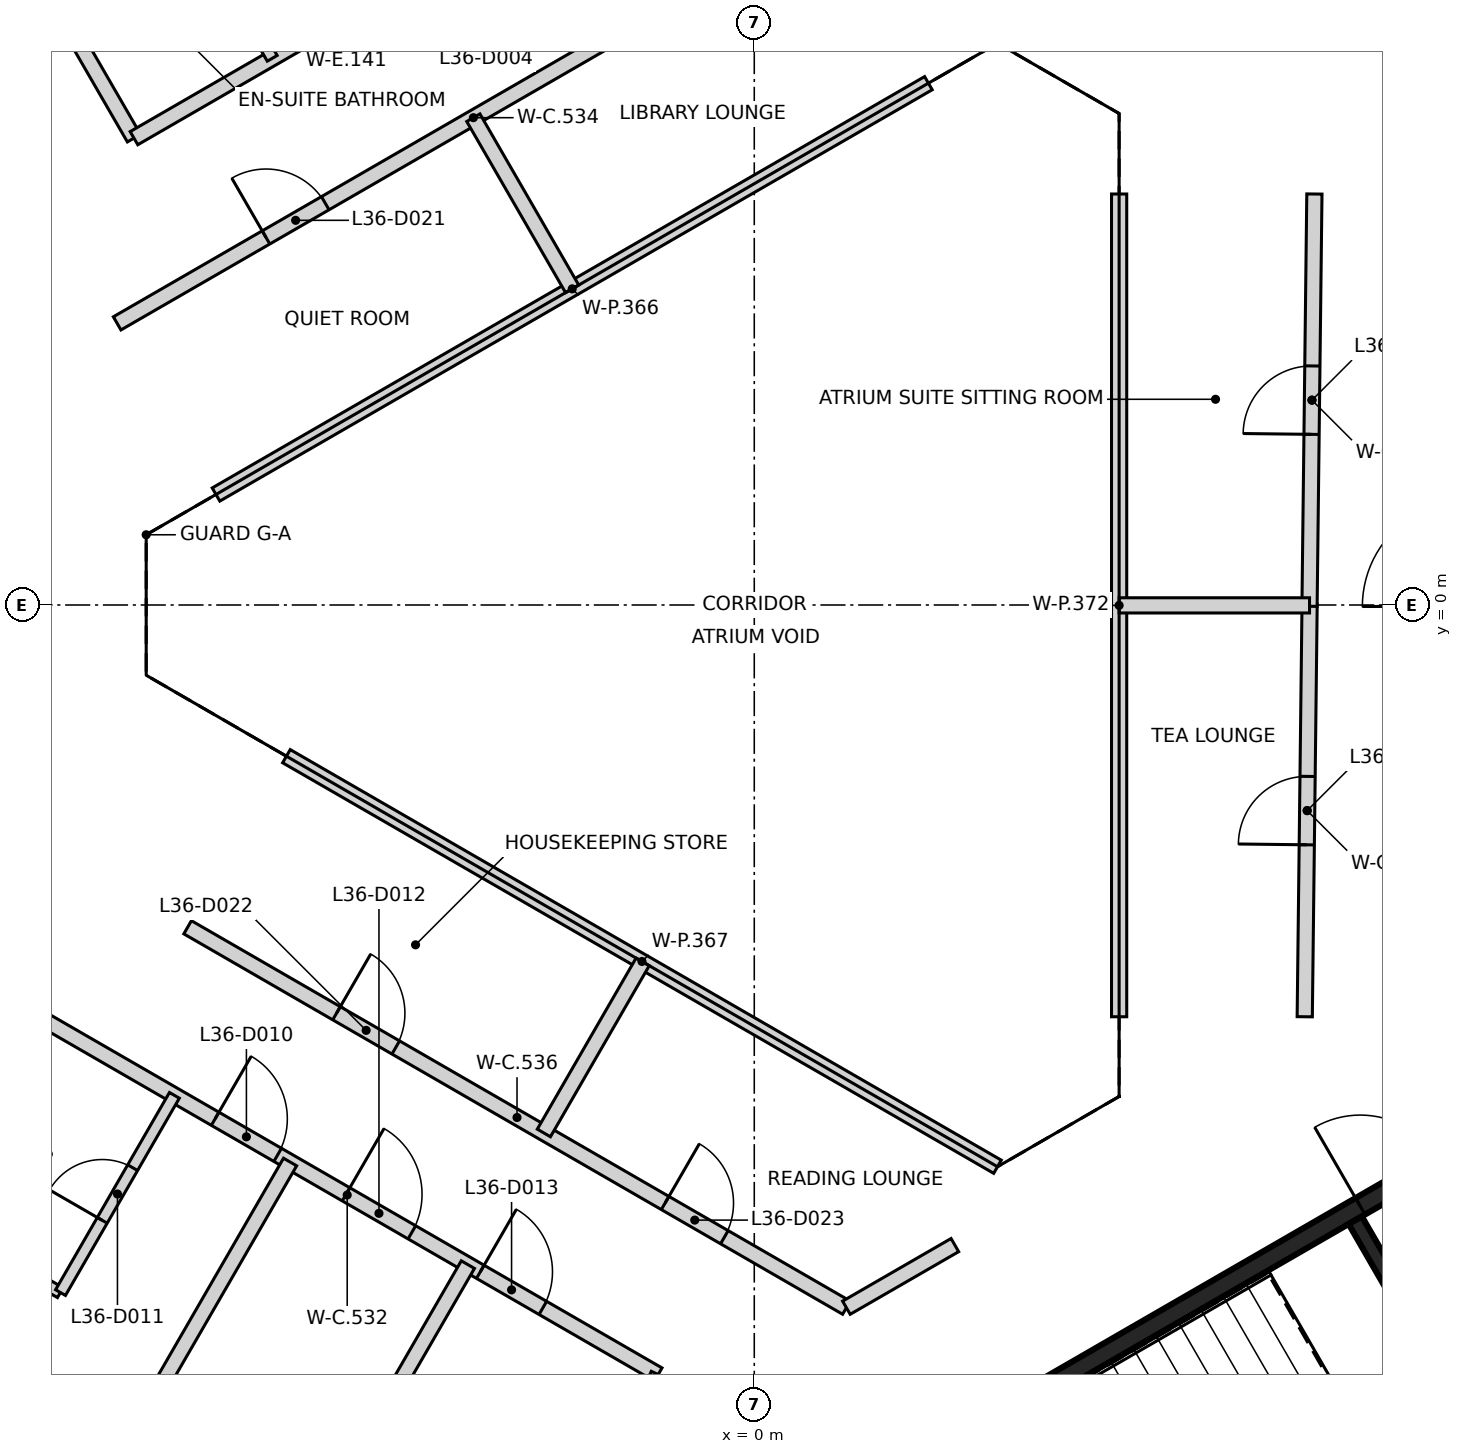
"""IFC4 building model, lengths in metres.
Left out: names, types, materials, properties, quantities, classifications, styles, units other than length and angle.
Written with IfcOpenShell. Run it as: python <this file> out.ifc"""

import sys

from ifc_helpers import new_model, si_unit, direction, frame, frame_2d, origin, place, context, subcontext, project, spatial, rectangle, extrude, element, fill, save


model = new_model("IFC4")
c1 = context("Model", 3, precision=1e-05, world=origin(), true_north=direction((0.0, 1.0)))
c2 = subcontext(c1, "Body", "Model", "MODEL_VIEW")
j1 = project(units=[si_unit("LENGTHUNIT", "METRE"), si_unit("PLANEANGLEUNIT", "RADIAN")], contexts=[c1])
p1 = place(None, origin())
s1 = spatial("IfcSite", under=j1, at=p1, CompositionType="ELEMENT")
p2 = place(p1, origin())
s2 = spatial("IfcBuilding", under=s1, at=p2, CompositionType="ELEMENT")
p3 = place(p2, frame((0.0, 0.0, 146.8)))
s3 = spatial("IfcBuildingStorey", under=s2, at=p3, CompositionType="ELEMENT", Elevation=146.8)
p4 = place(p3, frame((10.42, 6.498, 0.0), z_axis=(0.0, 0.0, 1.0), x_axis=(-0.866021906294, 0.500006057782, 0.0)))
e1 = element("IfcWall", 1, at=p4, inside=s3, PredefinedType="SHEAR", context=c2, shape_type="SweptSolid", body=[
    extrude(rectangle(XDim=11.55, YDim=0.25, at=frame_2d((5.775, 0.0))), origin(), (0.0, 0.0, 1.0), 3.2),
])
p5 = place(p4, frame((10.025, 0.0, 0.0)))
e2 = element("IfcOpeningElement", 2, at=p5, cuts=e1, PredefinedType="OPENING", context=c2, shape_type="SweptSolid", body=[
    extrude(rectangle(XDim=1.2, YDim=2.1, at=frame_2d((0.6, 1.05))), frame((0.0, 0.135, 0.0), z_axis=(0.0, -1.0, 0.0), x_axis=(1.0, 0.0, 0.0)), (0.0, 0.0, 1.0), 0.27),
])
p6 = place(p4, frame((8.725, 0.0, 0.0)))
e3 = element("IfcOpeningElement", 3, at=p6, cuts=e1, PredefinedType="OPENING", context=c2, shape_type="SweptSolid", body=[
    extrude(rectangle(XDim=1.2, YDim=2.1, at=frame_2d((0.6, 1.05))), frame((0.0, 0.135, 0.0), z_axis=(0.0, -1.0, 0.0), x_axis=(1.0, 0.0, 0.0)), (0.0, 0.0, 1.0), 0.27),
])
p7 = place(p3, frame((0.417, -12.273, 0.0), z_axis=(0.0, 0.0, 1.0), x_axis=(0.866021906294, 0.500006057782, 0.0)))
e4 = element("IfcWall", 4, at=p7, inside=s3, PredefinedType="SHEAR", context=c2, shape_type="SweptSolid", body=[
    extrude(rectangle(XDim=11.55, YDim=0.25, at=frame_2d((5.775, 0.0))), origin(), (0.0, 0.0, 1.0), 3.2),
])
p8 = place(p7, frame((10.025, 0.0, 0.0)))
e5 = element("IfcOpeningElement", 5, at=p8, cuts=e4, PredefinedType="OPENING", context=c2, shape_type="SweptSolid", body=[
    extrude(rectangle(XDim=1.2, YDim=2.1, at=frame_2d((0.6, 1.05))), frame((0.0, 0.135, 0.0), z_axis=(0.0, -1.0, 0.0), x_axis=(1.0, 0.0, 0.0)), (0.0, 0.0, 1.0), 0.27),
])
p9 = place(p7, frame((8.725, 0.0, 0.0)))
e6 = element("IfcOpeningElement", 6, at=p9, cuts=e4, PredefinedType="OPENING", context=c2, shape_type="SweptSolid", body=[
    extrude(rectangle(XDim=1.2, YDim=2.1, at=frame_2d((0.6, 1.05))), frame((0.0, 0.135, 0.0), z_axis=(0.0, -1.0, 0.0), x_axis=(1.0, 0.0, 0.0)), (0.0, 0.0, 1.0), 0.27),
])
p10 = place(p3, frame((7.906, -8.094, 0.0), z_axis=(0.0, 0.0, 1.0), x_axis=(0.500024287448, -0.866011380966, 0.0)))
e7 = element("IfcWall", 7, at=p10, inside=s3, PredefinedType="SHEAR", context=c2, shape_type="SweptSolid", body=[
    extrude(rectangle(XDim=5.251, YDim=0.2, at=frame_2d((2.625, 0.0))), origin(), (0.0, 0.0, 1.0), 3.2),
])
p11 = place(p10, frame((1.849, 0.0, 0.0)))
e8 = element("IfcOpeningElement", 8, at=p11, cuts=e7, PredefinedType="OPENING", context=c2, shape_type="SweptSolid", body=[
    extrude(rectangle(XDim=1.4, YDim=2.1, at=frame_2d((0.7, 1.05))), frame((0.0, 0.11, 0.0), z_axis=(0.0, -1.0, 0.0), x_axis=(1.0, 0.0, 0.0)), (0.0, 0.0, 1.0), 0.22),
])
p12 = place(p3, frame((-9.447, -5.4, 0.0), z_axis=(0.0, 0.0, 1.0), x_axis=(0.866101262146, -0.49986858644, 0.0)))
e9 = element("IfcWall", 9, at=p12, inside=s3, PredefinedType="PARTITIONING", context=c2, shape_type="SweptSolid", body=[
    extrude(rectangle(XDim=9.449, YDim=0.2, at=frame_2d((4.724, 0.0))), origin(), (0.0, 0.0, 1.0), 3.2),
])
p13 = place(p12, frame((2.718, 0.0, 0.0)))
e10 = element("IfcOpeningElement", 10, at=p13, cuts=e9, PredefinedType="OPENING", context=c2, shape_type="SweptSolid", body=[
    extrude(rectangle(XDim=0.95, YDim=2.1, at=frame_2d((0.475, 1.05))), frame((0.0, 0.11, 0.0), z_axis=(0.0, -1.0, 0.0), x_axis=(1.0, 0.0, 0.0)), (0.0, 0.0, 1.0), 0.22),
])
p14 = place(p12, frame((4.707, 0.0, 0.0)))
e11 = element("IfcOpeningElement", 11, at=p14, cuts=e9, PredefinedType="OPENING", context=c2, shape_type="SweptSolid", body=[
    extrude(rectangle(XDim=1.0, YDim=2.1, at=frame_2d((0.5, 1.05))), frame((0.0, 0.11, 0.0), z_axis=(0.0, -1.0, 0.0), x_axis=(1.0, 0.0, 0.0)), (0.0, 0.0, 1.0), 0.22),
])
p15 = place(p12, frame((6.746, 0.0, 0.0)))
e12 = element("IfcOpeningElement", 12, at=p15, cuts=e9, PredefinedType="OPENING", context=c2, shape_type="SweptSolid", body=[
    extrude(rectangle(XDim=0.95, YDim=2.1, at=frame_2d((0.475, 1.05))), frame((0.0, 0.11, 0.0), z_axis=(0.0, -1.0, 0.0), x_axis=(1.0, 0.0, 0.0)), (0.0, 0.0, 1.0), 0.22),
])
p16 = place(p3, frame((-9.033, 7.651, 0.0), z_axis=(0.0, 0.0, 1.0), x_axis=(0.500417633986, -0.865784148386, 0.0)))
e13 = element("IfcWall", 13, at=p16, inside=s3, PredefinedType="PARTITIONING", context=c2, shape_type="SweptSolid", body=[
    extrude(rectangle(XDim=1.743, YDim=0.2, at=frame_2d((0.871, 0.0))), origin(), (0.0, 0.0, 1.0), 3.2),
])
p17 = place(p3, frame((-8.382, 3.705, 0.0), z_axis=(0.0, 0.0, 1.0), x_axis=(0.866012036978, 0.500023151273, 0.0)))
e14 = element("IfcWall", 14, at=p17, inside=s3, PredefinedType="PARTITIONING", context=c2, shape_type="SweptSolid", body=[
    extrude(rectangle(XDim=10.823, YDim=0.2, at=frame_2d((5.412, 0.0))), origin(), (0.0, 0.0, 1.0), 3.2),
])
p18 = place(p17, frame((7.661, 0.0, 0.0)))
e15 = element("IfcOpeningElement", 15, at=p18, cuts=e14, PredefinedType="OPENING", context=c2, shape_type="SweptSolid", body=[
    extrude(rectangle(XDim=0.9, YDim=2.1, at=frame_2d((0.45, 1.05))), frame((0.0, 0.11, 0.0), z_axis=(0.0, -1.0, 0.0), x_axis=(1.0, 0.0, 0.0)), (0.0, 0.0, 1.0), 0.22),
])
p19 = place(p17, frame((2.261, 0.0, 0.0)))
e16 = element("IfcOpeningElement", 16, at=p19, cuts=e14, PredefinedType="OPENING", context=c2, shape_type="SweptSolid", body=[
    extrude(rectangle(XDim=0.9, YDim=2.1, at=frame_2d((0.45, 1.05))), frame((0.0, 0.11, 0.0), z_axis=(0.0, -1.0, 0.0), x_axis=(1.0, 0.0, 0.0)), (0.0, 0.0, 1.0), 0.22),
])
p20 = place(p3, frame((-8.161, 6.142, 0.0), z_axis=(0.0, 0.0, 1.0), x_axis=(0.865927304867, 0.500169873828, 0.0)))
e17 = element("IfcWall", 17, at=p20, inside=s3, PredefinedType="PARTITIONING", context=c2, shape_type="SweptSolid", body=[
    extrude(rectangle(XDim=9.478, YDim=0.2, at=frame_2d((4.739, 0.0))), origin(), (0.0, 0.0, 1.0), 3.2),
])
p21 = place(p20, frame((4.851, 0.0, 0.0)))
e18 = element("IfcOpeningElement", 18, at=p21, cuts=e17, PredefinedType="OPENING", context=c2, shape_type="SweptSolid", body=[
    extrude(rectangle(XDim=1.0, YDim=2.1, at=frame_2d((0.5, 1.05))), frame((0.0, 0.11, 0.0), z_axis=(0.0, -1.0, 0.0), x_axis=(1.0, 0.0, 0.0)), (0.0, 0.0, 1.0), 0.22),
])
p22 = place(p20, frame((7.583, 0.0, 0.0)))
e19 = element("IfcOpeningElement", 19, at=p22, cuts=e17, PredefinedType="OPENING", context=c2, shape_type="SweptSolid", body=[
    extrude(rectangle(XDim=1.0, YDim=2.1, at=frame_2d((0.5, 1.05))), frame((0.0, 0.11, 0.0), z_axis=(0.0, -1.0, 0.0), x_axis=(1.0, 0.0, 0.0)), (0.0, 0.0, 1.0), 0.22),
])
p23 = place(p3, frame((-7.455, -4.24, 0.0), z_axis=(0.0, 0.0, 1.0), x_axis=(0.866015783746, -0.500016662025, 0.0)))
e20 = element("IfcWall", 20, at=p23, inside=s3, PredefinedType="PARTITIONING", context=c2, shape_type="SweptSolid", body=[
    extrude(rectangle(XDim=10.009, YDim=0.2, at=frame_2d((5.004, 0.0))), origin(), (0.0, 0.0, 1.0), 3.2),
])
p24 = place(p23, frame((2.262, 0.0, 0.0)))
e21 = element("IfcOpeningElement", 21, at=p24, cuts=e20, PredefinedType="OPENING", context=c2, shape_type="SweptSolid", body=[
    extrude(rectangle(XDim=0.9, YDim=2.1, at=frame_2d((0.45, 1.05))), frame((0.0, 0.11, 0.0), z_axis=(0.0, -1.0, 0.0), x_axis=(1.0, 0.0, 0.0)), (0.0, 0.0, 1.0), 0.22),
])
p25 = place(p23, frame((7.254, 0.0, 0.0)))
e22 = element("IfcOpeningElement", 22, at=p25, cuts=e20, PredefinedType="OPENING", context=c2, shape_type="SweptSolid", body=[
    extrude(rectangle(XDim=0.9, YDim=2.1, at=frame_2d((0.45, 1.05))), frame((0.0, 0.11, 0.0), z_axis=(0.0, -1.0, 0.0), x_axis=(1.0, 0.0, 0.0)), (0.0, 0.0, 1.0), 0.22),
])
p26 = place(p3, frame((-2.162, -12.041, 0.0), z_axis=(0.0, 0.0, 1.0), x_axis=(0.424280226728, 0.905530943264, 0.0)))
e23 = element("IfcWall", 23, at=p26, inside=s3, PredefinedType="PARTITIONING", context=c2, shape_type="SweptSolid", body=[
    extrude(rectangle(XDim=2.117, YDim=0.2, at=frame_2d((1.059, 0.0))), origin(), (0.0, 0.0, 1.0), 3.2),
])
p27 = place(p3, frame((1.212, -9.245, 0.0), z_axis=(0.0, 0.0, 1.0), x_axis=(0.86593636949, 0.500154180222, 0.0)))
e24 = element("IfcWall", 24, at=p27, inside=s3, PredefinedType="PARTITIONING", context=c2, shape_type="SweptSolid", body=[
    extrude(rectangle(XDim=1.648, YDim=0.2, at=frame_2d((0.824, 0.0))), origin(), (0.0, 0.0, 1.0), 3.2),
])
p28 = place(p3, frame((7.242, -5.417, 0.0), z_axis=(0.0, 0.0, 1.0), x_axis=(0.01179195138, 0.999930472524, 0.0)))
e25 = element("IfcWall", 25, at=p28, inside=s3, PredefinedType="PARTITIONING", context=c2, shape_type="SweptSolid", body=[
    extrude(rectangle(XDim=5.425, YDim=0.2, at=frame_2d((2.712, 0.0))), origin(), (0.0, 0.0, 1.0), 3.2),
])
p29 = place(p28, frame((2.262, 0.0, 0.0)))
e26 = element("IfcOpeningElement", 26, at=p29, cuts=e25, PredefinedType="OPENING", context=c2, shape_type="SweptSolid", body=[
    extrude(rectangle(XDim=0.9, YDim=2.1, at=frame_2d((0.45, 1.05))), frame((0.0, 0.11, 0.0), z_axis=(0.0, -1.0, 0.0), x_axis=(1.0, 0.0, 0.0)), (0.0, 0.0, 1.0), 0.22),
])
p30 = place(p3, frame((7.305, -0.017, 0.0), z_axis=(0.0, 0.0, 1.0), x_axis=(0.01179195138, 0.999930472524, 0.0)))
e27 = element("IfcWall", 27, at=p30, inside=s3, PredefinedType="PARTITIONING", context=c2, shape_type="SweptSolid", body=[
    extrude(rectangle(XDim=5.425, YDim=0.2, at=frame_2d((2.712, 0.0))), origin(), (0.0, 0.0, 1.0), 3.2),
])
p31 = place(p30, frame((2.262, 0.0, 0.0)))
e28 = element("IfcOpeningElement", 28, at=p31, cuts=e27, PredefinedType="OPENING", context=c2, shape_type="SweptSolid", body=[
    extrude(rectangle(XDim=0.9, YDim=2.1, at=frame_2d((0.45, 1.05))), frame((0.0, 0.11, 0.0), z_axis=(0.0, -1.0, 0.0), x_axis=(1.0, 0.0, 0.0)), (0.0, 0.0, 1.0), 0.22),
])
p32 = place(p3, frame((-12.22, -17.917, 0.0), z_axis=(0.0, 0.0, 1.0), x_axis=(0.499963860175, 0.866046268117, 0.0)))
e29 = element("IfcWall", 29, at=p32, inside=s3, PredefinedType="PARTITIONING", context=c2, shape_type="SweptSolid", body=[
    extrude(rectangle(XDim=12.227, YDim=0.2, at=frame_2d((6.114, 0.0))), origin(), (0.0, 0.0, 1.0), 2.3),
])
p33 = place(p3, frame((-9.882, -19.267, 0.0), z_axis=(0.0, 0.0, 1.0), x_axis=(0.499993811829, 0.866028976497, 0.0)))
e30 = element("IfcWall", 30, at=p33, inside=s3, PredefinedType="PARTITIONING", context=c2, shape_type="SweptSolid", body=[
    extrude(rectangle(XDim=12.227, YDim=0.2, at=frame_2d((6.114, 0.0))), origin(), (0.0, 0.0, 1.0), 2.3),
])
p34 = place(p3, frame((-7.082, 1.453, 0.0), z_axis=(0.0, 0.0, 1.0), x_axis=(0.866010525116, 0.500025769724, 0.0)))
e31 = element("IfcWall", 31, at=p34, inside=s3, PredefinedType="PARTITIONING", context=c2, shape_type="SweptSolid", body=[
    extrude(rectangle(XDim=10.823, YDim=0.2, at=frame_2d((5.411, 0.0))), origin(), (0.0, 0.0, 1.0), 2.3),
])
p35 = place(p3, frame((-6.155, -1.989, 0.0), z_axis=(0.0, 0.0, 1.0), x_axis=(0.866009062299, -0.500028303215, 0.0)))
e32 = element("IfcWall", 32, at=p35, inside=s3, PredefinedType="PARTITIONING", context=c2, shape_type="SweptSolid", body=[
    extrude(rectangle(XDim=10.802, YDim=0.2, at=frame_2d((5.401, 0.0))), origin(), (0.0, 0.0, 1.0), 2.3),
])
p36 = place(p3, frame((-3.696, 6.411, 0.0), z_axis=(0.0, 0.0, 1.0), x_axis=(0.500006934395, -0.866021400173, 0.0)))
e33 = element("IfcWall", 33, at=p36, inside=s3, PredefinedType="PARTITIONING", context=c2, shape_type="SweptSolid", body=[
    extrude(rectangle(XDim=2.6, YDim=0.2, at=frame_2d((1.3, 0.0))), origin(), (0.0, 0.0, 1.0), 2.3),
])
p37 = place(p3, frame((-2.768, -6.946, 0.0), z_axis=(0.0, 0.0, 1.0), x_axis=(0.500017832597, 0.866015107885, 0.0)))
e34 = element("IfcWall", 34, at=p37, inside=s3, PredefinedType="PARTITIONING", context=c2, shape_type="SweptSolid", body=[
    extrude(rectangle(XDim=2.6, YDim=0.2, at=frame_2d((1.3, 0.0))), origin(), (0.0, 0.0, 1.0), 2.3),
])
p38 = place(p3, frame((4.8, -5.417, 0.0), z_axis=(0.0, 0.0, 1.0), x_axis=(0.0, 1.0, 0.0)))
e35 = element("IfcWall", 35, at=p38, inside=s3, PredefinedType="PARTITIONING", context=c2, shape_type="SweptSolid", body=[
    extrude(rectangle(XDim=10.824, YDim=0.2, at=frame_2d((5.412, 0.0))), origin(), (0.0, 0.0, 1.0), 2.3),
])
p39 = place(p3, frame((4.8, -0.005, 0.0), z_axis=(0.0, 0.0, 1.0), x_axis=(1.0, 0.0, 0.0)))
e36 = element("IfcWall", 36, at=p39, inside=s3, PredefinedType="PARTITIONING", context=c2, shape_type="SweptSolid", body=[
    extrude(rectangle(XDim=2.505, YDim=0.2, at=frame_2d((1.252, 0.0))), origin(), (0.0, 0.0, 1.0), 2.3),
])
p40 = place(p3, frame((-10.945, -7.999, 0.0), z_axis=(0.0, 0.0, 1.0), x_axis=(0.866005190944, -0.500035008033, 0.0)))
e37 = element("IfcWall", 37, at=p40, inside=s3, PredefinedType="PARTITIONING", context=c2, shape_type="SweptSolid", body=[
    extrude(rectangle(XDim=2.096, YDim=0.15, at=frame_2d((1.048, 0.0))), origin(), (0.0, 0.0, 1.0), 3.2),
])
p41 = place(p3, frame((-9.127, -9.046, 0.0), z_axis=(0.0, 0.0, 1.0), x_axis=(0.499959910729, 0.866048548099, 0.0)))
e38 = element("IfcWall", 38, at=p41, inside=s3, PredefinedType="PARTITIONING", context=c2, shape_type="SweptSolid", body=[
    extrude(rectangle(XDim=2.996, YDim=0.15, at=frame_2d((1.498, 0.0))), origin(), (0.0, 0.0, 1.0), 3.2),
])
p42 = place(p41, frame((1.098, 0.0, 0.0)))
e39 = element("IfcOpeningElement", 39, at=p42, cuts=e38, PredefinedType="OPENING", context=c2, shape_type="SweptSolid", body=[
    extrude(rectangle(XDim=0.8, YDim=2.1, at=frame_2d((0.4, 1.05))), frame((0.0, 0.085, 0.0), z_axis=(0.0, -1.0, 0.0), x_axis=(1.0, 0.0, 0.0)), (0.0, 0.0, 1.0), 0.17),
])
p43 = place(p3, frame((-7.843, 9.79, 0.0), z_axis=(0.0, 0.0, 1.0), x_axis=(0.500234218456, -0.865890135459, 0.0)))
e40 = element("IfcWall", 40, at=p43, inside=s3, PredefinedType="PARTITIONING", context=c2, shape_type="SweptSolid", body=[
    extrude(rectangle(XDim=3.0, YDim=0.15, at=frame_2d((1.5, 0.0))), origin(), (0.0, 0.0, 1.0), 3.2),
])
p44 = place(p43, frame((1.1, 0.0, 0.0)))
e41 = element("IfcOpeningElement", 41, at=p44, cuts=e40, PredefinedType="OPENING", context=c2, shape_type="SweptSolid", body=[
    extrude(rectangle(XDim=0.8, YDim=2.1, at=frame_2d((0.4, 1.05))), frame((0.0, 0.085, 0.0), z_axis=(0.0, -1.0, 0.0), x_axis=(1.0, 0.0, 0.0)), (0.0, 0.0, 1.0), 0.17),
])
p45 = place(p9, origin())
e42 = element("IfcDoor", 42, at=p45, inside=s3, OperationType="SINGLE_SWING_RIGHT", PredefinedType="DOOR", context=c2, shape_type="SweptSolid", body=[
    extrude(rectangle(XDim=1.2, YDim=2.1, at=frame_2d((0.6, 1.05))), frame((0.0, 0.025, 0.0), z_axis=(0.0, -1.0, 0.0), x_axis=(1.0, 0.0, 0.0)), (0.0, 0.0, 1.0), 0.05),
])
fill(e6, e42)
p46 = place(p13, frame((0.95, 0.0, 0.0), z_axis=(0.0, 0.0, 1.0), x_axis=(-1.0, 0.0, 0.0)))
e43 = element("IfcDoor", 43, at=p46, inside=s3, OperationType="SINGLE_SWING_LEFT", PredefinedType="DOOR", context=c2, shape_type="SweptSolid", body=[
    extrude(rectangle(XDim=0.95, YDim=2.1, at=frame_2d((0.475, 1.05))), frame((0.0, 0.025, 0.0), z_axis=(0.0, -1.0, 0.0), x_axis=(1.0, 0.0, 0.0)), (0.0, 0.0, 1.0), 0.05),
])
fill(e10, e43)
p47 = place(p42, origin())
e44 = element("IfcDoor", 44, at=p47, inside=s3, OperationType="SINGLE_SWING_LEFT", PredefinedType="DOOR", context=c2, shape_type="SweptSolid", body=[
    extrude(rectangle(XDim=0.8, YDim=2.1, at=frame_2d((0.4, 1.05))), frame((0.0, 0.025, 0.0), z_axis=(0.0, -1.0, 0.0), x_axis=(1.0, 0.0, 0.0)), (0.0, 0.0, 1.0), 0.05),
])
fill(e39, e44)
p48 = place(p14, frame((1.0, 0.0, 0.0), z_axis=(0.0, 0.0, 1.0), x_axis=(-1.0, 0.0, 0.0)))
e45 = element("IfcDoor", 45, at=p48, inside=s3, OperationType="SINGLE_SWING_LEFT", PredefinedType="DOOR", context=c2, shape_type="SweptSolid", body=[
    extrude(rectangle(XDim=1.0, YDim=2.1, at=frame_2d((0.5, 1.05))), frame((0.0, 0.025, 0.0), z_axis=(0.0, -1.0, 0.0), x_axis=(1.0, 0.0, 0.0)), (0.0, 0.0, 1.0), 0.05),
])
fill(e11, e45)
p49 = place(p15, frame((0.95, 0.0, 0.0), z_axis=(0.0, 0.0, 1.0), x_axis=(-1.0, 0.0, 0.0)))
e46 = element("IfcDoor", 46, at=p49, inside=s3, OperationType="SINGLE_SWING_LEFT", PredefinedType="DOOR", context=c2, shape_type="SweptSolid", body=[
    extrude(rectangle(XDim=0.95, YDim=2.1, at=frame_2d((0.475, 1.05))), frame((0.0, 0.025, 0.0), z_axis=(0.0, -1.0, 0.0), x_axis=(1.0, 0.0, 0.0)), (0.0, 0.0, 1.0), 0.05),
])
fill(e12, e46)
p50 = place(p29, origin())
e47 = element("IfcDoor", 47, at=p50, inside=s3, OperationType="SINGLE_SWING_LEFT", PredefinedType="DOOR", context=c2, shape_type="SweptSolid", body=[
    extrude(rectangle(XDim=0.9, YDim=2.1, at=frame_2d((0.45, 1.05))), frame((0.0, 0.025, 0.0), z_axis=(0.0, -1.0, 0.0), x_axis=(1.0, 0.0, 0.0)), (0.0, 0.0, 1.0), 0.05),
])
fill(e26, e47)
p51 = place(p31, origin())
e48 = element("IfcDoor", 48, at=p51, inside=s3, OperationType="SINGLE_SWING_LEFT", PredefinedType="DOOR", context=c2, shape_type="SweptSolid", body=[
    extrude(rectangle(XDim=0.9, YDim=2.1, at=frame_2d((0.45, 1.05))), frame((0.0, 0.025, 0.0), z_axis=(0.0, -1.0, 0.0), x_axis=(1.0, 0.0, 0.0)), (0.0, 0.0, 1.0), 0.05),
])
fill(e28, e48)
p52 = place(p19, frame((0.9, 0.0, 0.0), z_axis=(0.0, 0.0, 1.0), x_axis=(-1.0, 0.0, 0.0)))
e49 = element("IfcDoor", 49, at=p52, inside=s3, OperationType="SINGLE_SWING_LEFT", PredefinedType="DOOR", context=c2, shape_type="SweptSolid", body=[
    extrude(rectangle(XDim=0.9, YDim=2.1, at=frame_2d((0.45, 1.05))), frame((0.0, 0.025, 0.0), z_axis=(0.0, -1.0, 0.0), x_axis=(1.0, 0.0, 0.0)), (0.0, 0.0, 1.0), 0.05),
])
fill(e16, e49)
p53 = place(p24, origin())
e50 = element("IfcDoor", 50, at=p53, inside=s3, OperationType="SINGLE_SWING_LEFT", PredefinedType="DOOR", context=c2, shape_type="SweptSolid", body=[
    extrude(rectangle(XDim=0.9, YDim=2.1, at=frame_2d((0.45, 1.05))), frame((0.0, 0.025, 0.0), z_axis=(0.0, -1.0, 0.0), x_axis=(1.0, 0.0, 0.0)), (0.0, 0.0, 1.0), 0.05),
])
fill(e21, e50)
p54 = place(p25, origin())
e51 = element("IfcDoor", 51, at=p54, inside=s3, OperationType="SINGLE_SWING_LEFT", PredefinedType="DOOR", context=c2, shape_type="SweptSolid", body=[
    extrude(rectangle(XDim=0.9, YDim=2.1, at=frame_2d((0.45, 1.05))), frame((0.0, 0.025, 0.0), z_axis=(0.0, -1.0, 0.0), x_axis=(1.0, 0.0, 0.0)), (0.0, 0.0, 1.0), 0.05),
])
fill(e22, e51)
save(model, sys.argv[1])
